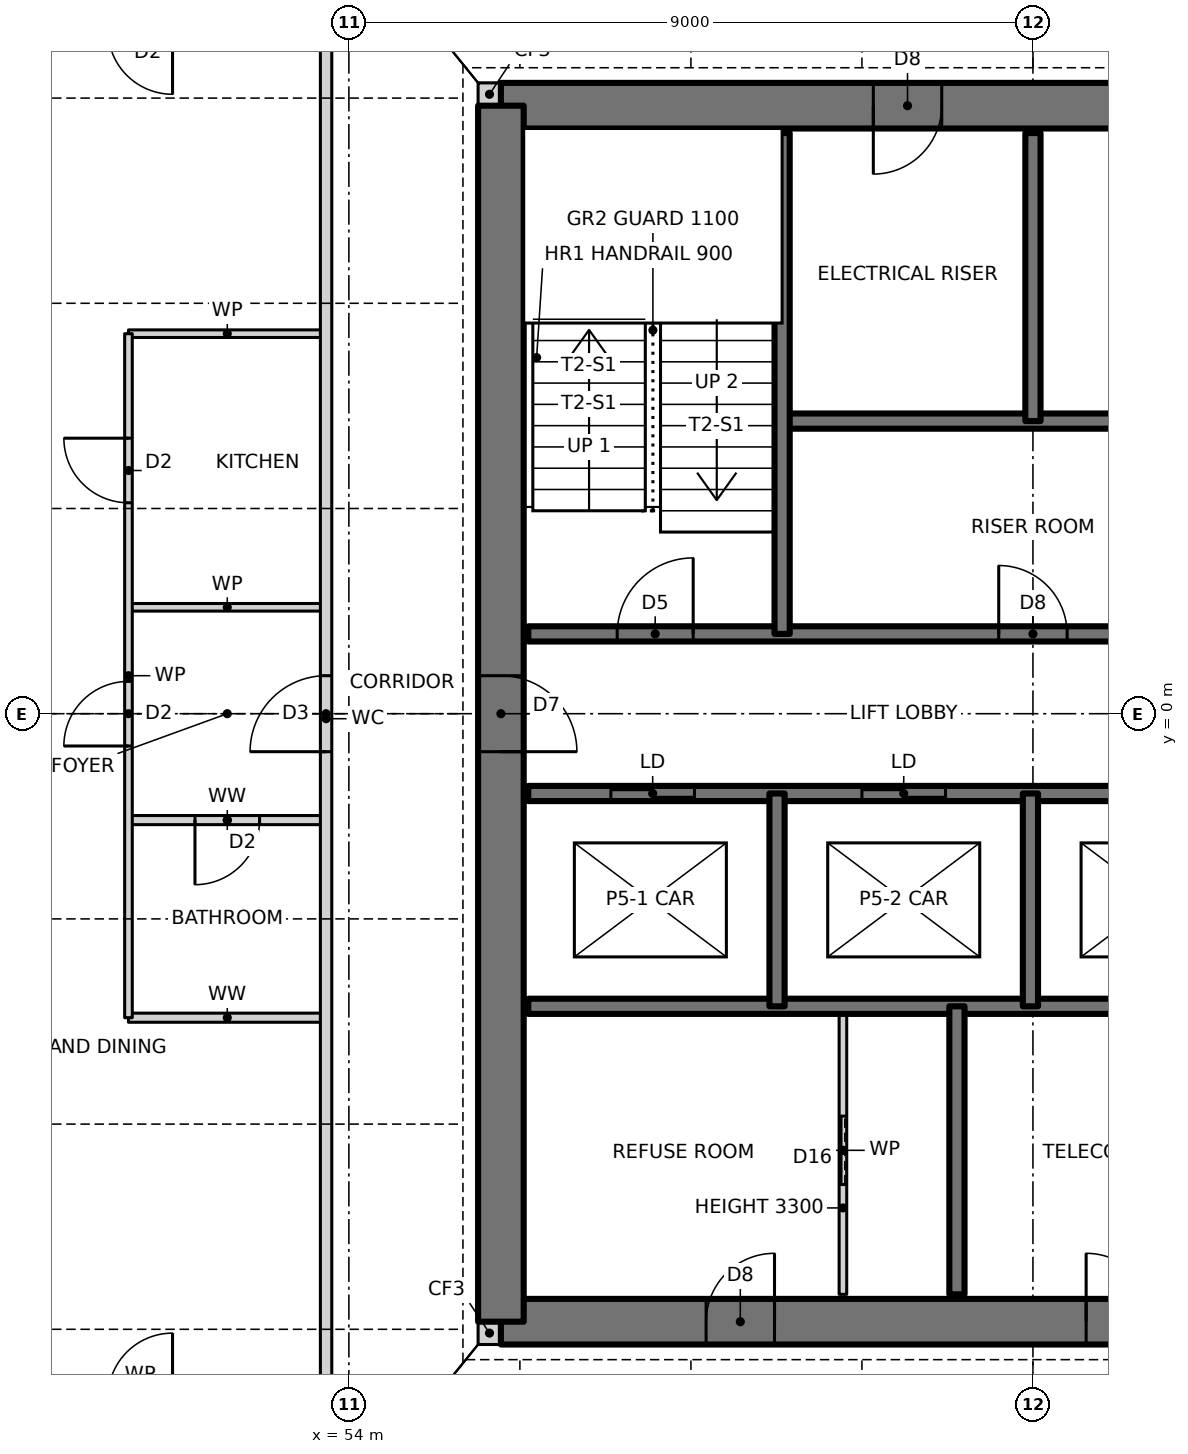
"""IFC4 building model, lengths in metres.
Left out: names, types, materials, properties, quantities, classifications, styles, units other than length and angle.
Written with IfcOpenShell. Run it as: python <this file> out.ifc"""

import sys

from ifc_helpers import new_model, si_unit, direction, frame, frame_2d, origin, place, context, subcontext, project, spatial, rectangle, extrude, element, fill, save


model = new_model("IFC4")
c1 = context("Model", 3, precision=1e-05, world=origin(), true_north=direction((0.0, 1.0)))
c2 = subcontext(c1, "Body", "Model", "MODEL_VIEW")
j1 = project(units=[si_unit("LENGTHUNIT", "METRE"), si_unit("PLANEANGLEUNIT", "RADIAN")], contexts=[c1])
p1 = place(None, origin())
s1 = spatial("IfcSite", under=j1, at=p1, CompositionType="ELEMENT")
p2 = place(p1, origin())
s2 = spatial("IfcBuilding", under=s1, at=p2, CompositionType="ELEMENT")
p3 = place(p2, frame((0.0, 0.0, 119.0)))
s3 = spatial("IfcBuildingStorey", under=s2, at=p3, CompositionType="ELEMENT", Elevation=119.0)
for number, where, z_axis, x_axis in (
    (1, (55.7, -8.15, 0.0), (0.0, 0.0, 1.0), (1.0, 0.0, 0.0)),
    (2, (55.7, 8.15, 0.0), (0.0, 0.0, 1.0), (1.0, 0.0, 0.0)),
):
    element("IfcWall", number, at=place(p3, frame(where, z_axis=z_axis, x_axis=x_axis)), inside=s3, PredefinedType="SOLIDWALL", context=c2, shape_type="SweptSolid", body=[
        extrude(rectangle(XDim=0.3, YDim=0.3, at=frame_2d((0.15, 0.0))), origin(), (0.0, 0.0, 1.0), 3.5),
    ])
p4 = place(p3, frame((56.0, -8.0, 0.0), z_axis=(0.0, 0.0, 1.0), x_axis=(1.0, 0.0, 0.0)))
e3 = element("IfcWall", 3, at=p4, inside=s3, PredefinedType="SHEAR", context=c2, shape_type="SweptSolid", body=[
    extrude(rectangle(XDim=14.0, YDim=0.6, at=frame_2d((7.0, 0.0))), origin(), (0.0, 0.0, 1.0), 3.5),
])
p5 = place(p4, frame((2.7, 0.0, 0.0)))
e4 = element("IfcOpeningElement", 4, at=p5, cuts=e3, PredefinedType="OPENING", context=c2, shape_type="SweptSolid", body=[
    extrude(rectangle(XDim=0.9, YDim=2.1, at=frame_2d((0.45, 1.05))), frame((0.0, 0.31, 0.0), z_axis=(0.0, -1.0, 0.0), x_axis=(1.0, 0.0, 0.0)), (0.0, 0.0, 1.0), 0.62),
])
p6 = place(p4, frame((7.7, 0.0, 0.0)))
e5 = element("IfcOpeningElement", 5, at=p6, cuts=e3, PredefinedType="OPENING", context=c2, shape_type="SweptSolid", body=[
    extrude(rectangle(XDim=0.9, YDim=2.1, at=frame_2d((0.45, 1.05))), frame((0.0, 0.31, 0.0), z_axis=(0.0, -1.0, 0.0), x_axis=(1.0, 0.0, 0.0)), (0.0, 0.0, 1.0), 0.62),
])
p7 = place(p3, frame((70.0, 8.0, 0.0), z_axis=(0.0, 0.0, 1.0), x_axis=(-1.0, 0.0, 0.0)))
e6 = element("IfcWall", 6, at=p7, inside=s3, PredefinedType="SHEAR", context=c2, shape_type="SweptSolid", body=[
    extrude(rectangle(XDim=14.0, YDim=0.6, at=frame_2d((7.0, 0.0))), origin(), (0.0, 0.0, 1.0), 3.5),
])
p8 = place(p7, frame((8.2, 0.0, 0.0)))
e7 = element("IfcOpeningElement", 7, at=p8, cuts=e6, PredefinedType="OPENING", context=c2, shape_type="SweptSolid", body=[
    extrude(rectangle(XDim=0.9, YDim=2.1, at=frame_2d((0.45, 1.05))), frame((0.0, 0.31, 0.0), z_axis=(0.0, -1.0, 0.0), x_axis=(1.0, 0.0, 0.0)), (0.0, 0.0, 1.0), 0.62),
])
p9 = place(p7, frame((3.2, 0.0, 0.0)))
e8 = element("IfcOpeningElement", 8, at=p9, cuts=e6, PredefinedType="OPENING", context=c2, shape_type="SweptSolid", body=[
    extrude(rectangle(XDim=0.9, YDim=2.1, at=frame_2d((0.45, 1.05))), frame((0.0, 0.31, 0.0), z_axis=(0.0, -1.0, 0.0), x_axis=(1.0, 0.0, 0.0)), (0.0, 0.0, 1.0), 0.62),
])
p10 = place(p3, frame((56.0, 8.0, 0.0), z_axis=(0.0, 0.0, 1.0), x_axis=(0.0, -1.0, 0.0)))
e9 = element("IfcWall", 9, at=p10, inside=s3, PredefinedType="SHEAR", context=c2, shape_type="SweptSolid", body=[
    extrude(rectangle(XDim=16.0, YDim=0.6, at=frame_2d((8.0, 0.0))), origin(), (0.0, 0.0, 1.0), 3.5),
])
p11 = place(p10, frame((7.5, 0.0, 0.0)))
e10 = element("IfcOpeningElement", 10, at=p11, cuts=e9, PredefinedType="OPENING", context=c2, shape_type="SweptSolid", body=[
    extrude(rectangle(XDim=1.0, YDim=2.1, at=frame_2d((0.5, 1.05))), frame((0.0, 0.31, 0.0), z_axis=(0.0, -1.0, 0.0), x_axis=(1.0, 0.0, 0.0)), (0.0, 0.0, 1.0), 0.62),
])
p12 = place(p3, frame((51.1, -4.0, 0.0), z_axis=(0.0, 0.0, 1.0), x_axis=(1.0, 0.0, 0.0)))
e11 = element("IfcWall", 11, at=p12, inside=s3, PredefinedType="PARTITIONING", context=c2, shape_type="SweptSolid", body=[
    extrude(rectangle(XDim=2.6, YDim=0.12, at=frame_2d((1.3, 0.0))), origin(), (0.0, 0.0, 1.0), 3.27),
])
p13 = place(p3, frame((56.36, -3.85, 0.0), z_axis=(0.0, 0.0, 1.0), x_axis=(1.0, 0.0, 0.0)))
e12 = element("IfcWall", 12, at=p13, inside=s3, PredefinedType="SOLIDWALL", context=c2, shape_type="SweptSolid", body=[
    extrude(rectangle(XDim=9.94, YDim=0.2, at=frame_2d((4.97, 0.0))), origin(), (0.0, 0.0, 1.0), 3.5),
])
p14 = place(p3, frame((51.1, -1.4, 0.0), z_axis=(0.0, 0.0, 1.0), x_axis=(1.0, 0.0, 0.0)))
e13 = element("IfcWall", 13, at=p14, inside=s3, PredefinedType="PARTITIONING", context=c2, shape_type="SweptSolid", body=[
    extrude(rectangle(XDim=2.6, YDim=0.12, at=frame_2d((1.3, 0.0))), origin(), (0.0, 0.0, 1.0), 3.27),
])
p15 = place(p14, frame((0.875, 0.0, 0.0)))
e14 = element("IfcOpeningElement", 14, at=p15, cuts=e13, PredefinedType="OPENING", context=c2, shape_type="SweptSolid", body=[
    extrude(rectangle(XDim=0.85, YDim=2.1, at=frame_2d((0.425, 1.05))), frame((0.0, 0.07, 0.0), z_axis=(0.0, -1.0, 0.0), x_axis=(1.0, 0.0, 0.0)), (0.0, 0.0, 1.0), 0.14),
])
p16 = place(p3, frame((56.36, -1.05, 0.0), z_axis=(0.0, 0.0, 1.0), x_axis=(1.0, 0.0, 0.0)))
e15 = element("IfcWall", 15, at=p16, inside=s3, PredefinedType="SOLIDWALL", context=c2, shape_type="SweptSolid", body=[
    extrude(rectangle(XDim=13.28, YDim=0.2, at=frame_2d((6.64, 0.0))), origin(), (0.0, 0.0, 1.0), 3.5),
])
p17 = place(p16, frame((11.11, 0.0, 0.0)))
e16 = element("IfcOpeningElement", 16, at=p17, cuts=e15, PredefinedType="OPENING", context=c2, shape_type="SweptSolid", body=[
    extrude(rectangle(XDim=1.0, YDim=2.1, at=frame_2d((0.5, 1.05))), frame((0.0, 0.11, 0.0), z_axis=(0.0, -1.0, 0.0), x_axis=(1.0, 0.0, 0.0)), (0.0, 0.0, 1.0), 0.22),
])
p18 = place(p16, frame((1.087, 0.0, 0.0)))
e17 = element("IfcOpeningElement", 17, at=p18, cuts=e15, PredefinedType="OPENING", context=c2, shape_type="SweptSolid", body=[
    extrude(rectangle(XDim=1.1, YDim=2.1, at=frame_2d((0.55, 1.05))), frame((0.0, 0.11, 0.0), z_axis=(0.0, -1.0, 0.0), x_axis=(1.0, 0.0, 0.0)), (0.0, 0.0, 1.0), 0.22),
])
p19 = place(p16, frame((4.39, 0.0, 0.0)))
e18 = element("IfcOpeningElement", 18, at=p19, cuts=e15, PredefinedType="OPENING", context=c2, shape_type="SweptSolid", body=[
    extrude(rectangle(XDim=1.1, YDim=2.1, at=frame_2d((0.55, 1.05))), frame((0.0, 0.11, 0.0), z_axis=(0.0, -1.0, 0.0), x_axis=(1.0, 0.0, 0.0)), (0.0, 0.0, 1.0), 0.22),
])
p20 = place(p16, frame((7.724, 0.0, 0.0)))
e19 = element("IfcOpeningElement", 19, at=p20, cuts=e15, PredefinedType="OPENING", context=c2, shape_type="SweptSolid", body=[
    extrude(rectangle(XDim=1.1, YDim=2.1, at=frame_2d((0.55, 1.05))), frame((0.0, 0.11, 0.0), z_axis=(0.0, -1.0, 0.0), x_axis=(1.0, 0.0, 0.0)), (0.0, 0.0, 1.0), 0.22),
])
p21 = place(p3, frame((56.36, 1.05, 0.0), z_axis=(0.0, 0.0, 1.0), x_axis=(1.0, 0.0, 0.0)))
e20 = element("IfcWall", 20, at=p21, inside=s3, PredefinedType="SOLIDWALL", context=c2, shape_type="SweptSolid", body=[
    extrude(rectangle(XDim=13.28, YDim=0.2, at=frame_2d((6.64, 0.0))), origin(), (0.0, 0.0, 1.0), 3.5),
])
p22 = place(p21, frame((1.17, 0.0, 0.0)))
e21 = element("IfcOpeningElement", 21, at=p22, cuts=e20, PredefinedType="OPENING", context=c2, shape_type="SweptSolid", body=[
    extrude(rectangle(XDim=1.0, YDim=2.1, at=frame_2d((0.5, 1.05))), frame((0.0, 0.11, 0.0), z_axis=(0.0, -1.0, 0.0), x_axis=(1.0, 0.0, 0.0)), (0.0, 0.0, 1.0), 0.22),
])
p23 = place(p21, frame((6.19, 0.0, 0.0)))
e22 = element("IfcOpeningElement", 22, at=p23, cuts=e20, PredefinedType="OPENING", context=c2, shape_type="SweptSolid", body=[
    extrude(rectangle(XDim=0.9, YDim=2.1, at=frame_2d((0.45, 1.05))), frame((0.0, 0.11, 0.0), z_axis=(0.0, -1.0, 0.0), x_axis=(1.0, 0.0, 0.0)), (0.0, 0.0, 1.0), 0.22),
])
p24 = place(p21, frame((10.96, 0.0, 0.0)))
e23 = element("IfcOpeningElement", 23, at=p24, cuts=e20, PredefinedType="OPENING", context=c2, shape_type="SweptSolid", body=[
    extrude(rectangle(XDim=1.3, YDim=2.1, at=frame_2d((0.65, 1.05))), frame((0.0, 0.11, 0.0), z_axis=(0.0, -1.0, 0.0), x_axis=(1.0, 0.0, 0.0)), (0.0, 0.0, 1.0), 0.22),
])
p25 = place(p3, frame((51.1, 1.4, 0.0), z_axis=(0.0, 0.0, 1.0), x_axis=(1.0, 0.0, 0.0)))
e24 = element("IfcWall", 24, at=p25, inside=s3, PredefinedType="PARTITIONING", context=c2, shape_type="SweptSolid", body=[
    extrude(rectangle(XDim=2.6, YDim=0.1, at=frame_2d((1.3, 0.0))), origin(), (0.0, 0.0, 1.0), 3.27),
])
p26 = place(p3, frame((59.7, 3.85, 0.0), z_axis=(0.0, 0.0, 1.0), x_axis=(1.0, 0.0, 0.0)))
e25 = element("IfcWall", 25, at=p26, inside=s3, PredefinedType="SOLIDWALL", context=c2, shape_type="SweptSolid", body=[
    extrude(rectangle(XDim=9.94, YDim=0.2, at=frame_2d((4.97, 0.0))), origin(), (0.0, 0.0, 1.0), 3.5),
])
p27 = place(p3, frame((51.1, 5.0, 0.0), z_axis=(0.0, 0.0, 1.0), x_axis=(1.0, 0.0, 0.0)))
e26 = element("IfcWall", 26, at=p27, inside=s3, PredefinedType="PARTITIONING", context=c2, shape_type="SweptSolid", body=[
    extrude(rectangle(XDim=2.6, YDim=0.1, at=frame_2d((1.3, 0.0))), origin(), (0.0, 0.0, 1.0), 3.27),
])
p28 = place(p3, frame((63.0, 3.85, 0.0), z_axis=(0.0, 0.0, 1.0), x_axis=(0.0, 1.0, 0.0)))
e27 = element("IfcWall", 27, at=p28, inside=s3, PredefinedType="SOLIDWALL", context=c2, shape_type="SweptSolid", body=[
    extrude(rectangle(XDim=3.79, YDim=0.2, at=frame_2d((1.895, 0.0))), origin(), (0.0, 0.0, 1.0), 3.5),
])
p29 = place(p3, frame((62.967, -3.85, 0.0), z_axis=(0.0, 0.0, 1.0), x_axis=(0.0, 1.0, 0.0)))
e28 = element("IfcWall", 28, at=p29, inside=s3, PredefinedType="SOLIDWALL", context=c2, shape_type="SweptSolid", body=[
    extrude(rectangle(XDim=2.8, YDim=0.2, at=frame_2d((1.4, 0.0))), origin(), (0.0, 0.0, 1.0), 3.5),
])
p30 = place(p3, frame((62.0, -7.64, 0.0), z_axis=(0.0, 0.0, 1.0), x_axis=(0.0, 1.0, 0.0)))
e29 = element("IfcWall", 29, at=p30, inside=s3, PredefinedType="SOLIDWALL", context=c2, shape_type="SweptSolid", body=[
    extrude(rectangle(XDim=3.79, YDim=0.2, at=frame_2d((1.895, 0.0))), origin(), (0.0, 0.0, 1.0), 3.5),
])
p31 = place(p3, frame((60.5, -7.64, 0.0), z_axis=(0.0, 0.0, 1.0), x_axis=(0.0, 1.0, 0.0)))
e30 = element("IfcWall", 30, at=p31, inside=s3, PredefinedType="PARTITIONING", context=c2, shape_type="SweptSolid", body=[
    extrude(rectangle(XDim=3.79, YDim=0.1, at=frame_2d((1.895, 0.0))), origin(), (0.0, 0.0, 1.0), 3.3),
])
p32 = place(p31, frame((1.445, 0.0, 0.0)))
e31 = element("IfcOpeningElement", 31, at=p32, cuts=e30, PredefinedType="OPENING", context=c2, shape_type="SweptSolid", body=[
    extrude(rectangle(XDim=0.9, YDim=2.1, at=frame_2d((0.45, 1.05))), frame((0.0, 0.06, 0.0), z_axis=(0.0, -1.0, 0.0), x_axis=(1.0, 0.0, 0.0)), (0.0, 0.0, 1.0), 0.12),
])
p33 = place(p3, frame((59.7, 1.05, 0.0), z_axis=(0.0, 0.0, 1.0), x_axis=(0.0, 1.0, 0.0)))
e32 = element("IfcWall", 32, at=p33, inside=s3, PredefinedType="SOLIDWALL", context=c2, shape_type="SweptSolid", body=[
    extrude(rectangle(XDim=6.59, YDim=0.2, at=frame_2d((3.295, 0.0))), origin(), (0.0, 0.0, 1.0), 3.5),
])
p34 = place(p3, frame((59.633, -3.85, 0.0), z_axis=(0.0, 0.0, 1.0), x_axis=(0.0, 1.0, 0.0)))
e33 = element("IfcWall", 33, at=p34, inside=s3, PredefinedType="SOLIDWALL", context=c2, shape_type="SweptSolid", body=[
    extrude(rectangle(XDim=2.8, YDim=0.2, at=frame_2d((1.4, 0.0))), origin(), (0.0, 0.0, 1.0), 3.5),
])
p35 = place(p3, frame((53.7, -10.9, 0.0), z_axis=(0.0, 0.0, 1.0), x_axis=(0.0, 1.0, 0.0)))
e34 = element("IfcWall", 34, at=p35, inside=s3, PredefinedType="PARTITIONING", context=c2, shape_type="SweptSolid", body=[
    extrude(rectangle(XDim=21.668, YDim=0.15, at=frame_2d((10.834, 0.0))), origin(), (0.0, 0.0, 1.0), 3.27),
])
p36 = place(p35, frame((10.4, 0.0, 0.0)))
e35 = element("IfcOpeningElement", 35, at=p36, cuts=e34, PredefinedType="OPENING", context=c2, shape_type="SweptSolid", body=[
    extrude(rectangle(XDim=1.0, YDim=2.1, at=frame_2d((0.5, 1.05))), frame((0.0, 0.085, 0.0), z_axis=(0.0, -1.0, 0.0), x_axis=(1.0, 0.0, 0.0)), (0.0, 0.0, 1.0), 0.17),
])
p37 = place(p3, frame((51.1, -4.0, 0.0), z_axis=(0.0, 0.0, 1.0), x_axis=(0.0, 1.0, 0.0)))
e36 = element("IfcWall", 36, at=p37, inside=s3, PredefinedType="PARTITIONING", context=c2, shape_type="SweptSolid", body=[
    extrude(rectangle(XDim=9.0, YDim=0.1, at=frame_2d((4.5, 0.0))), origin(), (0.0, 0.0, 1.0), 3.27),
])
p38 = place(p37, frame((6.775, 0.0, 0.0)))
e37 = element("IfcOpeningElement", 37, at=p38, cuts=e36, PredefinedType="OPENING", context=c2, shape_type="SweptSolid", body=[
    extrude(rectangle(XDim=0.85, YDim=2.1, at=frame_2d((0.425, 1.05))), frame((0.0, 0.06, 0.0), z_axis=(0.0, -1.0, 0.0), x_axis=(1.0, 0.0, 0.0)), (0.0, 0.0, 1.0), 0.12),
])
p39 = place(p37, frame((3.575, 0.0, 0.0)))
e38 = element("IfcOpeningElement", 38, at=p39, cuts=e36, PredefinedType="OPENING", context=c2, shape_type="SweptSolid", body=[
    extrude(rectangle(XDim=0.85, YDim=2.1, at=frame_2d((0.425, 1.05))), frame((0.0, 0.06, 0.0), z_axis=(0.0, -1.0, 0.0), x_axis=(1.0, 0.0, 0.0)), (0.0, 0.0, 1.0), 0.12),
])
p40 = place(p22, origin())
e39 = element("IfcDoor", 39, at=p40, inside=s3, OperationType="SINGLE_SWING_RIGHT", PredefinedType="DOOR", context=c2, shape_type="SweptSolid", body=[
    extrude(rectangle(XDim=1.0, YDim=2.1, at=frame_2d((0.5, 1.05))), frame((0.0, 0.025, 0.0), z_axis=(0.0, -1.0, 0.0), x_axis=(1.0, 0.0, 0.0)), (0.0, 0.0, 1.0), 0.05),
])
fill(e21, e39)
p41 = place(p23, origin())
e40 = element("IfcDoor", 40, at=p41, inside=s3, OperationType="SINGLE_SWING_LEFT", PredefinedType="DOOR", context=c2, shape_type="SweptSolid", body=[
    extrude(rectangle(XDim=0.9, YDim=2.1, at=frame_2d((0.45, 1.05))), frame((0.0, 0.025, 0.0), z_axis=(0.0, -1.0, 0.0), x_axis=(1.0, 0.0, 0.0)), (0.0, 0.0, 1.0), 0.05),
])
fill(e22, e40)
p42 = place(p32, origin())
e41 = element("IfcDoor", 41, at=p42, inside=s3, OperationType="SLIDING_TO_LEFT", PredefinedType="DOOR", context=c2, shape_type="SweptSolid", body=[
    extrude(rectangle(XDim=0.9, YDim=2.1, at=frame_2d((0.45, 1.05))), frame((0.0, 0.025, 0.0), z_axis=(0.0, -1.0, 0.0), x_axis=(1.0, 0.0, 0.0)), (0.0, 0.0, 1.0), 0.05),
])
fill(e31, e41)
p43 = place(p38, origin())
e42 = element("IfcDoor", 42, at=p43, inside=s3, OperationType="SINGLE_SWING_RIGHT", PredefinedType="DOOR", context=c2, shape_type="SweptSolid", body=[
    extrude(rectangle(XDim=0.85, YDim=2.1, at=frame_2d((0.425, 1.05))), frame((0.0, 0.025, 0.0), z_axis=(0.0, -1.0, 0.0), x_axis=(1.0, 0.0, 0.0)), (0.0, 0.0, 1.0), 0.05),
])
fill(e37, e42)
p44 = place(p36, origin())
e43 = element("IfcDoor", 43, at=p44, inside=s3, OperationType="SINGLE_SWING_LEFT", PredefinedType="DOOR", context=c2, shape_type="SweptSolid", body=[
    extrude(rectangle(XDim=1.0, YDim=2.1, at=frame_2d((0.5, 1.05))), frame((0.0, 0.025, 0.0), z_axis=(0.0, -1.0, 0.0), x_axis=(1.0, 0.0, 0.0)), (0.0, 0.0, 1.0), 0.05),
])
fill(e35, e43)
p45 = place(p39, origin())
e44 = element("IfcDoor", 44, at=p45, inside=s3, OperationType="SINGLE_SWING_LEFT", PredefinedType="DOOR", context=c2, shape_type="SweptSolid", body=[
    extrude(rectangle(XDim=0.85, YDim=2.1, at=frame_2d((0.425, 1.05))), frame((0.0, 0.025, 0.0), z_axis=(0.0, -1.0, 0.0), x_axis=(1.0, 0.0, 0.0)), (0.0, 0.0, 1.0), 0.05),
])
fill(e38, e44)
p46 = place(p15, frame((0.85, 0.0, 0.0), z_axis=(0.0, 0.0, 1.0), x_axis=(-1.0, 0.0, 0.0)))
e45 = element("IfcDoor", 45, at=p46, inside=s3, OperationType="SINGLE_SWING_RIGHT", PredefinedType="DOOR", context=c2, shape_type="SweptSolid", body=[
    extrude(rectangle(XDim=0.85, YDim=2.1, at=frame_2d((0.425, 1.05))), frame((0.0, 0.025, 0.0), z_axis=(0.0, -1.0, 0.0), x_axis=(1.0, 0.0, 0.0)), (0.0, 0.0, 1.0), 0.05),
])
fill(e14, e45)
p47 = place(p11, origin())
e46 = element("IfcDoor", 46, at=p47, inside=s3, OperationType="SINGLE_SWING_RIGHT", PredefinedType="DOOR", context=c2, shape_type="SweptSolid", body=[
    extrude(rectangle(XDim=1.0, YDim=2.1, at=frame_2d((0.5, 1.05))), frame((0.0, 0.025, 0.0), z_axis=(0.0, -1.0, 0.0), x_axis=(1.0, 0.0, 0.0)), (0.0, 0.0, 1.0), 0.05),
])
fill(e10, e46)
p48 = place(p8, origin())
e47 = element("IfcDoor", 47, at=p48, inside=s3, OperationType="SINGLE_SWING_RIGHT", PredefinedType="DOOR", context=c2, shape_type="SweptSolid", body=[
    extrude(rectangle(XDim=0.9, YDim=2.1, at=frame_2d((0.45, 1.05))), frame((0.0, 0.025, 0.0), z_axis=(0.0, -1.0, 0.0), x_axis=(1.0, 0.0, 0.0)), (0.0, 0.0, 1.0), 0.05),
])
fill(e7, e47)
p49 = place(p5, origin())
e48 = element("IfcDoor", 48, at=p49, inside=s3, OperationType="SINGLE_SWING_RIGHT", PredefinedType="DOOR", context=c2, shape_type="SweptSolid", body=[
    extrude(rectangle(XDim=0.9, YDim=2.1, at=frame_2d((0.45, 1.05))), frame((0.0, 0.025, 0.0), z_axis=(0.0, -1.0, 0.0), x_axis=(1.0, 0.0, 0.0)), (0.0, 0.0, 1.0), 0.05),
])
fill(e4, e48)
p50 = place(p6, origin())
e49 = element("IfcDoor", 49, at=p50, inside=s3, OperationType="SINGLE_SWING_LEFT", PredefinedType="DOOR", context=c2, shape_type="SweptSolid", body=[
    extrude(rectangle(XDim=0.9, YDim=2.1, at=frame_2d((0.45, 1.05))), frame((0.0, 0.025, 0.0), z_axis=(0.0, -1.0, 0.0), x_axis=(1.0, 0.0, 0.0)), (0.0, 0.0, 1.0), 0.05),
])
fill(e5, e49)
p51 = place(p18, origin())
e50 = element("IfcDoor", 50, at=p51, inside=s3, OperationType="DOUBLE_DOOR_SLIDING", PredefinedType="DOOR", context=c2, shape_type="SweptSolid", body=[
    extrude(rectangle(XDim=1.1, YDim=2.1, at=frame_2d((0.55, 1.05))), frame((0.0, 0.025, 0.0), z_axis=(0.0, -1.0, 0.0), x_axis=(1.0, 0.0, 0.0)), (0.0, 0.0, 1.0), 0.05),
])
fill(e17, e50)
p52 = place(p19, origin())
e51 = element("IfcDoor", 51, at=p52, inside=s3, OperationType="DOUBLE_DOOR_SLIDING", PredefinedType="DOOR", context=c2, shape_type="SweptSolid", body=[
    extrude(rectangle(XDim=1.1, YDim=2.1, at=frame_2d((0.55, 1.05))), frame((0.0, 0.025, 0.0), z_axis=(0.0, -1.0, 0.0), x_axis=(1.0, 0.0, 0.0)), (0.0, 0.0, 1.0), 0.05),
])
fill(e18, e51)
save(model, sys.argv[1])
